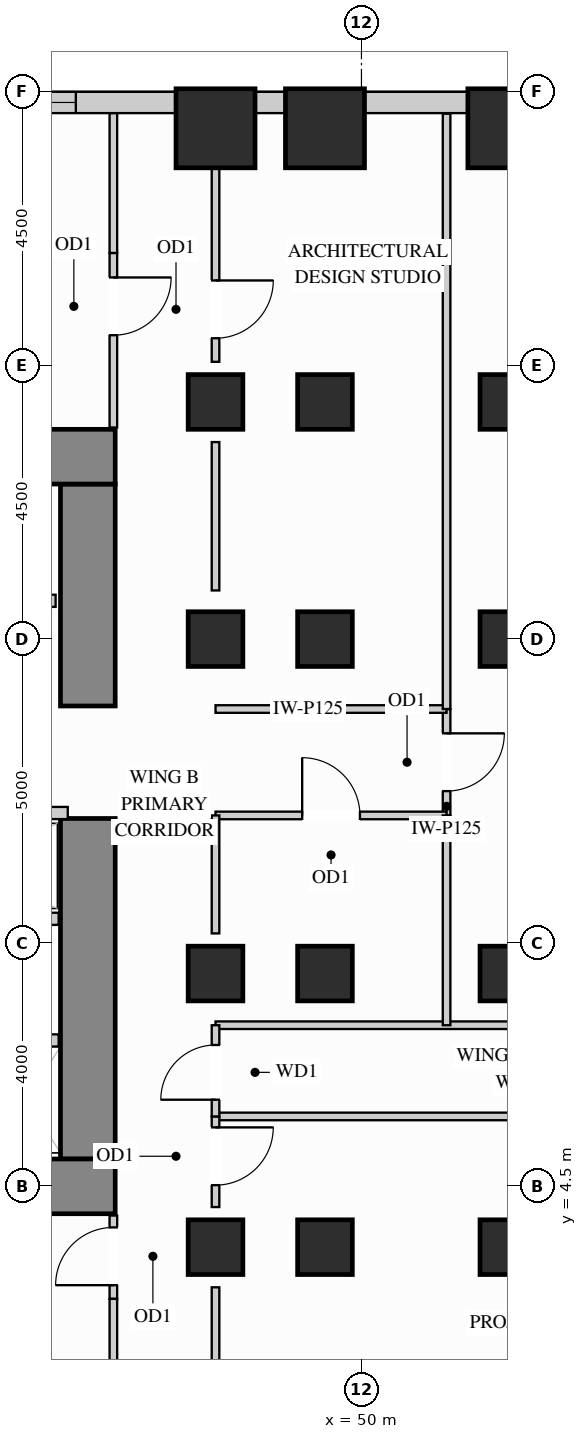
"""IFC4 building model, lengths in metres.
Left out: names, types, materials, properties, quantities, classifications, styles, units other than length and angle.
Written with IfcOpenShell. Run it as: python <this file> out.ifc"""

import sys

from ifc_helpers import new_model, si_unit, direction, frame, frame_2d, origin, origin_2d, place, context, subcontext, project, spatial, rectangle, extrude, source, transform, mapped, element, fill, save


model = new_model("IFC4")
c1 = context("Model", 3, precision=1e-05, world=origin(), true_north=direction((0.0, 1.0)))
c2 = subcontext(c1, "Body", "Model", "MODEL_VIEW")
j1 = project(units=[si_unit("LENGTHUNIT", "METRE"), si_unit("PLANEANGLEUNIT", "RADIAN")], contexts=[c1])
p1 = place(None, origin())
s1 = spatial("IfcSite", under=j1, at=p1, CompositionType="ELEMENT")
p2 = place(p1, origin())
s2 = spatial("IfcBuilding", under=s1, at=p2, CompositionType="ELEMENT")
p3 = place(p2, frame((0.0, 0.0, 47.7)))
s3 = spatial("IfcBuildingStorey", under=s2, at=p3, CompositionType="ELEMENT", Elevation=47.7)
m1 = source(origin(), c2, "Body", "SweptSolid", [
    extrude(rectangle(XDim=0.9, YDim=0.9, at=origin_2d()), origin(), (0.0, 0.0, 1.0), 3.38),
])
for number, where, z_axis, x_axis in (
    (1, (47.6, 13.5, 0.0), (0.0, 0.0, 1.0), (1.0, 0.0, 0.0)),
    (2, (47.6, 3.5, 0.0), (0.0, 0.0, 1.0), (1.0, 0.0, 0.0)),
    (3, (47.6, 8.0, 0.0), (0.0, 0.0, 1.0), (1.0, 0.0, 0.0)),
    (4, (47.6, 17.4, 0.0), (0.0, 0.0, 1.0), (1.0, 0.0, 0.0)),
    (5, (49.4, 13.5, 0.0), (0.0, 0.0, 1.0), (1.0, 0.0, 0.0)),
    (6, (49.4, 17.4, 0.0), (0.0, 0.0, 1.0), (1.0, 0.0, 0.0)),
    (7, (49.4, 3.5, 0.0), (0.0, 0.0, 1.0), (1.0, 0.0, 0.0)),
    (8, (49.4, 8.0, 0.0), (0.0, 0.0, 1.0), (1.0, 0.0, 0.0)),
    (9, (52.4, 13.5, 0.0), (0.0, 0.0, 1.0), (1.0, 0.0, 0.0)),
    (10, (52.4, 17.4, 0.0), (0.0, 0.0, 1.0), (1.0, 0.0, 0.0)),
    (11, (52.4, 3.5, 0.0), (0.0, 0.0, 1.0), (1.0, 0.0, 0.0)),
    (12, (52.4, 8.0, 0.0), (0.0, 0.0, 1.0), (1.0, 0.0, 0.0)),
):
    element("IfcColumn", number, at=place(p3, frame(where, z_axis=z_axis, x_axis=x_axis)), inside=s3, PredefinedType="COLUMN", context=c2, shape_type="MappedRepresentation", body=[
        mapped(m1, transform((0.0, 0.0, 0.0), x_axis=(1.0, 0.0, 0.0), y_axis=(0.0, 1.0, 0.0), z_axis=(0.0, 0.0, 1.0))),
    ])
m2 = source(origin(), c2, "Body", "SweptSolid", [
    extrude(rectangle(XDim=1.3, YDim=1.3, at=origin_2d()), origin(), (0.0, 0.0, 1.0), 3.38),
])
for number, where, z_axis, x_axis in (
    (13, (47.6, 21.9, 0.0), (0.0, 0.0, 1.0), (1.0, 0.0, 0.0)),
    (14, (49.4, 21.9, 0.0), (0.0, 0.0, 1.0), (1.0, 0.0, 0.0)),
    (15, (52.4, 21.9, 0.0), (0.0, 0.0, 1.0), (1.0, 0.0, 0.0)),
):
    element("IfcColumn", number, at=place(p3, frame(where, z_axis=z_axis, x_axis=x_axis)), inside=s3, PredefinedType="COLUMN", context=c2, shape_type="MappedRepresentation", body=[
        mapped(m2, transform((0.0, 0.0, 0.0), x_axis=(1.0, 0.0, 0.0), y_axis=(0.0, 1.0, 0.0), z_axis=(0.0, 0.0, 1.0))),
    ])
m3 = source(origin(), c2, "Body", "SweptSolid", [
    extrude(rectangle(XDim=5.6, YDim=0.9, at=frame_2d((2.8, 0.0))), origin(), (0.0, 0.0, 1.0), 3.38),
])
p4 = place(p3, frame((45.5, 4.95, 0.0), z_axis=(0.0, 0.0, 1.0), x_axis=(0.0, 1.0, 0.0)))
e16 = element("IfcWall", 16, at=p4, inside=s3, PredefinedType="SHEAR", context=c2, shape_type="MappedRepresentation", body=[
    mapped(m3, transform((0.0, 0.0, 0.0), x_axis=(1.0, 0.0, 0.0), y_axis=(0.0, 1.0, 0.0), z_axis=(0.0, 0.0, 1.0))),
])
m4 = source(origin(), c2, "Body", "SweptSolid", [
    extrude(rectangle(XDim=3.65, YDim=0.9, at=frame_2d((1.825, 0.0))), origin(), (0.0, 0.0, 1.0), 3.38),
])
p5 = place(p3, frame((45.5, 12.4, 0.0), z_axis=(0.0, 0.0, 1.0), x_axis=(0.0, 1.0, 0.0)))
e17 = element("IfcWall", 17, at=p5, inside=s3, PredefinedType="SHEAR", context=c2, shape_type="MappedRepresentation", body=[
    mapped(m4, transform((0.0, 0.0, 0.0), x_axis=(1.0, 0.0, 0.0), y_axis=(0.0, 1.0, 0.0), z_axis=(0.0, 0.0, 1.0))),
])
m5 = source(origin(), c2, "Body", "SweptSolid", [
    extrude(rectangle(XDim=10.4, YDim=0.9, at=frame_2d((5.2, 0.0))), origin(), (0.0, 0.0, 1.0), 3.38),
])
for number, where, z_axis, x_axis in (
    (18, (35.55, 16.5, 0.0), (0.0, 0.0, 1.0), (1.0, 0.0, 0.0)),
    (19, (35.55, 4.5, 0.0), (0.0, 0.0, 1.0), (1.0, 0.0, 0.0)),
):
    element("IfcWall", number, at=place(p3, frame(where, z_axis=z_axis, x_axis=x_axis)), inside=s3, PredefinedType="SHEAR", context=c2, shape_type="MappedRepresentation", body=[
        mapped(m5, transform((0.0, 0.0, 0.0), x_axis=(1.0, 0.0, 0.0), y_axis=(0.0, 1.0, 0.0), z_axis=(0.0, 0.0, 1.0))),
    ])
m6 = source(origin(), c2, "Body", "SweptSolid", [
    extrude(rectangle(XDim=1.704, YDim=0.35, at=frame_2d((0.852, 0.0))), origin(), (0.0, 0.0, 1.0), 2.51),
])
p6 = place(p3, frame((51.752, 22.325, 0.0), z_axis=(0.0, 0.0, 1.0), x_axis=(-1.0, 0.0, 0.0)))
e20 = element("IfcWall", 20, at=p6, inside=s3, PredefinedType="SOLIDWALL", context=c2, shape_type="MappedRepresentation", body=[
    mapped(m6, transform((0.0, 0.0, 0.0), x_axis=(1.0, 0.0, 0.0), y_axis=(0.0, 1.0, 0.0), z_axis=(0.0, 0.0, 1.0))),
])
m7 = source(origin(), c2, "Body", "SweptSolid", [
    extrude(rectangle(XDim=0.504, YDim=0.35, at=frame_2d((0.252, 0.0))), origin(), (0.0, 0.0, 1.0), 3.365),
])
p7 = place(p3, frame((48.752, 22.325, 0.0), z_axis=(0.0, 0.0, 1.0), x_axis=(-1.0, 0.0, 0.0)))
e21 = element("IfcWall", 21, at=p7, inside=s3, PredefinedType="SOLIDWALL", context=c2, shape_type="MappedRepresentation", body=[
    mapped(m7, transform((0.0, 0.0, 0.0), x_axis=(1.0, 0.0, 0.0), y_axis=(0.0, 1.0, 0.0), z_axis=(0.0, 0.0, 1.0))),
])
p8 = place(p3, frame((46.952, 22.325, 0.0), z_axis=(0.0, 0.0, 1.0), x_axis=(-1.0, 0.0, 0.0)))
e22 = element("IfcWall", 22, at=p8, inside=s3, PredefinedType="SOLIDWALL", context=c2, shape_type="SweptSolid", body=[
    extrude(rectangle(XDim=6.304, YDim=0.35, at=frame_2d((3.152, 0.0))), origin(), (0.0, 0.0, 1.0), 2.51),
])
p9 = place(p8, frame((1.649, 0.0, 0.78)))
e23 = element("IfcOpeningElement", 23, at=p9, cuts=e22, PredefinedType="OPENING", context=c2, shape_type="SweptSolid", body=[
    extrude(rectangle(XDim=1.8, YDim=1.55, at=frame_2d((0.9, 0.775))), frame((0.0, 0.185, 0.0), z_axis=(0.0, -1.0, 0.0), x_axis=(1.0, 0.0, 0.0)), (0.0, 0.0, 1.0), 0.37),
])
p10 = place(p8, frame((3.817, 0.0, 0.78)))
e24 = element("IfcOpeningElement", 24, at=p10, cuts=e22, PredefinedType="OPENING", context=c2, shape_type="SweptSolid", body=[
    extrude(rectangle(XDim=1.8, YDim=1.55, at=frame_2d((0.9, 0.775))), frame((0.0, 0.185, 0.0), z_axis=(0.0, -1.0, 0.0), x_axis=(1.0, 0.0, 0.0)), (0.0, 0.0, 1.0), 0.37),
])
p11 = place(p3, frame((51.4, 10.6, 0.0), z_axis=(0.0, 0.0, 1.0), x_axis=(0.0, 1.0, 0.0)))
e25 = element("IfcWall", 25, at=p11, inside=s3, PredefinedType="PARTITIONING", context=c2, shape_type="SweptSolid", body=[
    extrude(rectangle(XDim=1.75, YDim=0.125, at=frame_2d((0.875, 0.0))), origin(), (0.0, 0.0, 1.0), 3.365),
])
p12 = place(p11, frame((0.4, 0.0, 0.0)))
e26 = element("IfcOpeningElement", 26, at=p12, cuts=e25, PredefinedType="OPENING", context=c2, shape_type="SweptSolid", body=[
    extrude(rectangle(XDim=0.95, YDim=2.15, at=frame_2d((0.475, 1.075))), frame((0.0, 0.073, 0.0), z_axis=(0.0, -1.0, 0.0), x_axis=(1.0, 0.0, 0.0)), (0.0, 0.0, 1.0), 0.145),
])
m8 = source(origin(), c2, "Body", "SweptSolid", [
    extrude(rectangle(XDim=11.048, YDim=0.125, at=frame_2d((5.524, 0.0))), origin(), (0.0, 0.0, 1.0), 3.365),
])
for number, where, z_axis, x_axis in (
    (27, (47.6, 5.65, 0.0), (0.0, 0.0, 1.0), (1.0, 0.0, 0.0)),
    (28, (47.6, 7.15, 0.0), (0.0, 0.0, 1.0), (1.0, 0.0, 0.0)),
):
    element("IfcWall", number, at=place(p3, frame(where, z_axis=z_axis, x_axis=x_axis)), inside=s3, PredefinedType="PARTITIONING", context=c2, shape_type="MappedRepresentation", body=[
        mapped(m8, transform((0.0, 0.0, 0.0), x_axis=(1.0, 0.0, 0.0), y_axis=(0.0, 1.0, 0.0), z_axis=(0.0, 0.0, 1.0))),
    ])
m9 = source(origin(), c2, "Body", "SweptSolid", [
    extrude(rectangle(XDim=3.8, YDim=0.125, at=frame_2d((1.9, 0.0))), origin(), (0.0, 0.0, 1.0), 3.365),
])
p13 = place(p3, frame((47.6, 12.35, 0.0), z_axis=(0.0, 0.0, 1.0), x_axis=(1.0, 0.0, 0.0)))
e29 = element("IfcWall", 29, at=p13, inside=s3, PredefinedType="PARTITIONING", context=c2, shape_type="MappedRepresentation", body=[
    mapped(m9, transform((0.0, 0.0, 0.0), x_axis=(1.0, 0.0, 0.0), y_axis=(0.0, 1.0, 0.0), z_axis=(0.0, 0.0, 1.0))),
])
p14 = place(p3, frame((47.6, 10.6, 0.0), z_axis=(0.0, 0.0, 1.0), x_axis=(1.0, 0.0, 0.0)))
e30 = element("IfcWall", 30, at=p14, inside=s3, PredefinedType="PARTITIONING", context=c2, shape_type="SweptSolid", body=[
    extrude(rectangle(XDim=3.8, YDim=0.125, at=frame_2d((1.9, 0.0))), origin(), (0.0, 0.0, 1.0), 2.67),
])
p15 = place(p14, frame((1.425, 0.0, 0.0)))
e31 = element("IfcOpeningElement", 31, at=p15, cuts=e30, PredefinedType="OPENING", context=c2, shape_type="SweptSolid", body=[
    extrude(rectangle(XDim=0.95, YDim=2.15, at=frame_2d((0.475, 1.075))), frame((0.0, 0.073, 0.0), z_axis=(0.0, -1.0, 0.0), x_axis=(1.0, 0.0, 0.0)), (0.0, 0.0, 1.0), 0.145),
])
m10 = source(origin(), c2, "Body", "SweptSolid", [
    extrude(rectangle(XDim=3.45, YDim=0.125, at=frame_2d((1.725, 0.0))), origin(), (0.0, 0.0, 1.0), 3.365),
])
p16 = place(p3, frame((51.4, 7.15, 0.0), z_axis=(0.0, 0.0, 1.0), x_axis=(0.0, 1.0, 0.0)))
e32 = element("IfcWall", 32, at=p16, inside=s3, PredefinedType="PARTITIONING", context=c2, shape_type="MappedRepresentation", body=[
    mapped(m10, transform((0.0, 0.0, 0.0), x_axis=(1.0, 0.0, 0.0), y_axis=(0.0, 1.0, 0.0), z_axis=(0.0, 0.0, 1.0))),
])
m11 = source(origin(), c2, "Body", "SweptSolid", [
    extrude(rectangle(XDim=9.79, YDim=0.125, at=frame_2d((4.895, 0.0))), origin(), (0.0, 0.0, 1.0), 3.365),
])
p17 = place(p3, frame((51.4, 12.35, 0.0), z_axis=(0.0, 0.0, 1.0), x_axis=(0.0, 1.0, 0.0)))
e33 = element("IfcWall", 33, at=p17, inside=s3, PredefinedType="PARTITIONING", context=c2, shape_type="MappedRepresentation", body=[
    mapped(m11, transform((0.0, 0.0, 0.0), x_axis=(1.0, 0.0, 0.0), y_axis=(0.0, 1.0, 0.0), z_axis=(0.0, 0.0, 1.0))),
])
p18 = place(p3, frame((47.6, 4.16, 0.0), z_axis=(0.0, 0.0, 1.0), x_axis=(0.0, 1.0, 0.0)))
e34 = element("IfcWall", 34, at=p18, inside=s3, PredefinedType="PARTITIONING", context=c2, shape_type="SweptSolid", body=[
    extrude(rectangle(XDim=1.49, YDim=0.125, at=frame_2d((0.745, 0.0))), origin(), (0.0, 0.0, 1.0), 2.67),
])
p19 = place(p18, frame((0.36, 0.0, 0.0)))
e35 = element("IfcOpeningElement", 35, at=p19, cuts=e34, PredefinedType="OPENING", context=c2, shape_type="SweptSolid", body=[
    extrude(rectangle(XDim=0.95, YDim=2.15, at=frame_2d((0.475, 1.075))), frame((0.0, 0.073, 0.0), z_axis=(0.0, -1.0, 0.0), x_axis=(1.0, 0.0, 0.0)), (0.0, 0.0, 1.0), 0.145),
])
m12 = source(origin(), c2, "Body", "SweptSolid", [
    extrude(rectangle(XDim=1.58, YDim=0.125, at=frame_2d((0.79, 0.0))), origin(), (0.0, 0.0, 1.0), 2.67),
])
p20 = place(p3, frame((47.6, 1.26, 0.0), z_axis=(0.0, 0.0, 1.0), x_axis=(0.0, 1.0, 0.0)))
e36 = element("IfcWall", 36, at=p20, inside=s3, PredefinedType="PARTITIONING", context=c2, shape_type="MappedRepresentation", body=[
    mapped(m12, transform((0.0, 0.0, 0.0), x_axis=(1.0, 0.0, 0.0), y_axis=(0.0, 1.0, 0.0), z_axis=(0.0, 0.0, 1.0))),
])
m13 = source(origin(), c2, "Body", "SweptSolid", [
    extrude(rectangle(XDim=1.94, YDim=0.125, at=frame_2d((0.97, 0.0))), origin(), (0.0, 0.0, 1.0), 2.67),
])
p21 = place(p3, frame((47.6, 8.66, 0.0), z_axis=(0.0, 0.0, 1.0), x_axis=(0.0, 1.0, 0.0)))
e37 = element("IfcWall", 37, at=p21, inside=s3, PredefinedType="PARTITIONING", context=c2, shape_type="MappedRepresentation", body=[
    mapped(m13, transform((0.0, 0.0, 0.0), x_axis=(1.0, 0.0, 0.0), y_axis=(0.0, 1.0, 0.0), z_axis=(0.0, 0.0, 1.0))),
])
m14 = source(origin(), c2, "Body", "SweptSolid", [
    extrude(rectangle(XDim=2.44, YDim=0.125, at=frame_2d((1.22, 0.0))), origin(), (0.0, 0.0, 1.0), 2.67),
])
p22 = place(p3, frame((47.6, 14.3, 0.0), z_axis=(0.0, 0.0, 1.0), x_axis=(0.0, 1.0, 0.0)))
e38 = element("IfcWall", 38, at=p22, inside=s3, PredefinedType="PARTITIONING", context=c2, shape_type="MappedRepresentation", body=[
    mapped(m14, transform((0.0, 0.0, 0.0), x_axis=(1.0, 0.0, 0.0), y_axis=(0.0, 1.0, 0.0), z_axis=(0.0, 0.0, 1.0))),
])
p23 = place(p3, frame((47.6, 18.06, 0.0), z_axis=(0.0, 0.0, 1.0), x_axis=(0.0, 1.0, 0.0)))
e39 = element("IfcWall", 39, at=p23, inside=s3, PredefinedType="PARTITIONING", context=c2, shape_type="SweptSolid", body=[
    extrude(rectangle(XDim=3.18, YDim=0.125, at=frame_2d((1.59, 0.0))), origin(), (0.0, 0.0, 1.0), 2.67),
])
p24 = place(p23, frame((0.388, 0.0, 0.0)))
e40 = element("IfcOpeningElement", 40, at=p24, cuts=e39, PredefinedType="OPENING", context=c2, shape_type="SweptSolid", body=[
    extrude(rectangle(XDim=0.95, YDim=2.15, at=frame_2d((0.475, 1.075))), frame((0.0, 0.073, 0.0), z_axis=(0.0, -1.0, 0.0), x_axis=(1.0, 0.0, 0.0)), (0.0, 0.0, 1.0), 0.145),
])
p25 = place(p3, frame((47.6, 5.65, 0.0), z_axis=(0.0, 0.0, 1.0), x_axis=(0.0, 1.0, 0.0)))
e41 = element("IfcWall", 41, at=p25, inside=s3, PredefinedType="PARTITIONING", context=c2, shape_type="SweptSolid", body=[
    extrude(rectangle(XDim=1.5, YDim=0.125, at=frame_2d((0.75, 0.0))), origin(), (0.0, 0.0, 1.0), 2.67),
])
p26 = place(p25, frame((0.275, 0.0, 0.0)))
e42 = element("IfcOpeningElement", 42, at=p26, cuts=e41, PredefinedType="OPENING", context=c2, shape_type="SweptSolid", body=[
    extrude(rectangle(XDim=0.9, YDim=2.15, at=frame_2d((0.45, 1.075))), frame((0.0, 0.073, 0.0), z_axis=(0.0, -1.0, 0.0), x_axis=(1.0, 0.0, 0.0)), (0.0, 0.0, 1.0), 0.145),
])
p27 = place(p3, frame((45.92, 16.98, 0.0), z_axis=(0.0, 0.0, 1.0), x_axis=(0.0, 1.0, 0.0)))
e43 = element("IfcWall", 43, at=p27, inside=s3, PredefinedType="PARTITIONING", context=c2, shape_type="SweptSolid", body=[
    extrude(rectangle(XDim=2.87, YDim=0.125, at=frame_2d((1.435, 0.0))), origin(), (0.0, 0.0, 1.0), 3.365),
])
p28 = place(p27, frame((1.517, 0.0, 0.0)))
e44 = element("IfcOpeningElement", 44, at=p28, cuts=e43, PredefinedType="OPENING", context=c2, shape_type="SweptSolid", body=[
    extrude(rectangle(XDim=0.95, YDim=2.15, at=frame_2d((0.475, 1.075))), frame((0.0, 0.073, 0.0), z_axis=(0.0, -1.0, 0.0), x_axis=(1.0, 0.0, 0.0)), (0.0, 0.0, 1.0), 0.145),
])
m15 = source(origin(), c2, "Body", "SweptSolid", [
    extrude(rectangle(XDim=2.298, YDim=0.125, at=frame_2d((1.149, 0.0))), origin(), (0.0, 0.0, 1.0), 3.365),
])
p29 = place(p3, frame((45.92, 19.85, 0.0), z_axis=(0.0, 0.0, 1.0), x_axis=(0.0, 1.0, 0.0)))
e45 = element("IfcWall", 45, at=p29, inside=s3, PredefinedType="PARTITIONING", context=c2, shape_type="MappedRepresentation", body=[
    mapped(m15, transform((0.0, 0.0, 0.0), x_axis=(1.0, 0.0, 0.0), y_axis=(0.0, 1.0, 0.0), z_axis=(0.0, 0.0, 1.0))),
])
p30 = place(p3, frame((45.92, 2.65, 0.0), z_axis=(0.0, 0.0, 1.0), x_axis=(0.0, 1.0, 0.0)))
e46 = element("IfcWall", 46, at=p30, inside=s3, PredefinedType="PARTITIONING", context=c2, shape_type="SweptSolid", body=[
    extrude(rectangle(XDim=1.37, YDim=0.125, at=frame_2d((0.685, 0.0))), origin(), (0.0, 0.0, 1.0), 3.365),
])
p31 = place(p30, frame((0.225, 0.0, 0.0)))
e47 = element("IfcOpeningElement", 47, at=p31, cuts=e46, PredefinedType="OPENING", context=c2, shape_type="SweptSolid", body=[
    extrude(rectangle(XDim=0.95, YDim=2.15, at=frame_2d((0.475, 1.075))), frame((0.0, 0.073, 0.0), z_axis=(0.0, -1.0, 0.0), x_axis=(1.0, 0.0, 0.0)), (0.0, 0.0, 1.0), 0.145),
])
p32 = place(p3, frame((45.92, 0.352, 0.0), z_axis=(0.0, 0.0, 1.0), x_axis=(0.0, 1.0, 0.0)))
e48 = element("IfcWall", 48, at=p32, inside=s3, PredefinedType="PARTITIONING", context=c2, shape_type="MappedRepresentation", body=[
    mapped(m15, transform((0.0, 0.0, 0.0), x_axis=(1.0, 0.0, 0.0), y_axis=(0.0, 1.0, 0.0), z_axis=(0.0, 0.0, 1.0))),
])
m16 = source(origin(), c2, "Body", "SweptSolid", [
    extrude(rectangle(XDim=1.17, YDim=0.2, at=frame_2d((0.585, 0.0))), origin(), (0.0, 0.0, 1.0), 3.365),
])
p33 = place(p3, frame((43.85, 6.9, 0.0), z_axis=(0.0, 0.0, 1.0), x_axis=(1.0, 0.0, 0.0)))
e49 = element("IfcWall", 49, at=p33, inside=s3, PredefinedType="PARTITIONING", context=c2, shape_type="MappedRepresentation", body=[
    mapped(m16, transform((0.0, 0.0, 0.0), x_axis=(1.0, 0.0, 0.0), y_axis=(0.0, 1.0, 0.0), z_axis=(0.0, 0.0, 1.0))),
])
p34 = place(p3, frame((42.23, 14.13, 0.0), z_axis=(0.0, 0.0, 1.0), x_axis=(1.0, 0.0, 0.0)))
e50 = element("IfcWall", 50, at=p34, inside=s3, PredefinedType="PARTITIONING", context=c2, shape_type="SweptSolid", body=[
    extrude(rectangle(XDim=2.74, YDim=0.2, at=frame_2d((1.37, 0.0))), origin(), (0.0, 0.0, 1.0), 3.365),
])
p35 = place(p34, frame((0.82, 0.0, 0.0)))
e51 = element("IfcOpeningElement", 51, at=p35, cuts=e50, PredefinedType="OPENING", context=c2, shape_type="SweptSolid", body=[
    extrude(rectangle(XDim=1.1, YDim=2.2, at=frame_2d((0.55, 1.1))), frame((0.0, 0.11, 0.0), z_axis=(0.0, -1.0, 0.0), x_axis=(1.0, 0.0, 0.0)), (0.0, 0.0, 1.0), 0.22),
])
m17 = source(origin(), c2, "Body", "SweptSolid", [
    extrude(rectangle(XDim=3.49, YDim=0.2, at=frame_2d((1.745, 0.0))), origin(), (0.0, 0.0, 1.0), 3.365),
])
p36 = place(p3, frame((41.68, 10.64, 0.0), z_axis=(0.0, 0.0, 1.0), x_axis=(1.0, 0.0, 0.0)))
e52 = element("IfcWall", 52, at=p36, inside=s3, PredefinedType="PARTITIONING", context=c2, shape_type="MappedRepresentation", body=[
    mapped(m17, transform((0.0, 0.0, 0.0), x_axis=(1.0, 0.0, 0.0), y_axis=(0.0, 1.0, 0.0), z_axis=(0.0, 0.0, 1.0))),
])
m18 = source(origin(), c2, "Body", "SweptSolid", [
    extrude(rectangle(XDim=3.34, YDim=0.2, at=frame_2d((1.67, 0.0))), origin(), (0.0, 0.0, 1.0), 3.365),
])
p37 = place(p3, frame((41.68, 8.9, 0.0), z_axis=(0.0, 0.0, 1.0), x_axis=(1.0, 0.0, 0.0)))
e53 = element("IfcWall", 53, at=p37, inside=s3, PredefinedType="PARTITIONING", context=c2, shape_type="MappedRepresentation", body=[
    mapped(m18, transform((0.0, 0.0, 0.0), x_axis=(1.0, 0.0, 0.0), y_axis=(0.0, 1.0, 0.0), z_axis=(0.0, 0.0, 1.0))),
])
m19 = source(origin(), c2, "Body", "SweptSolid", [
    extrude(rectangle(XDim=0.95, YDim=2.15, at=frame_2d((0.475, 1.075))), frame((0.0, 0.025, 0.0), z_axis=(0.0, -1.0, 0.0), x_axis=(1.0, 0.0, 0.0)), (0.0, 0.0, 1.0), 0.05),
])
p38 = place(p28, origin())
e54 = element("IfcDoor", 54, at=p38, inside=s3, OperationType="SINGLE_SWING_RIGHT", PredefinedType="DOOR", context=c2, shape_type="MappedRepresentation", body=[
    mapped(m19, transform((0.0, 0.0, 0.0), x_axis=(1.0, 0.0, 0.0), y_axis=(0.0, 1.0, 0.0), z_axis=(0.0, 0.0, 1.0))),
])
fill(e44, e54)
p39 = place(p31, origin())
e55 = element("IfcDoor", 55, at=p39, inside=s3, OperationType="SINGLE_SWING_LEFT", PredefinedType="DOOR", context=c2, shape_type="MappedRepresentation", body=[
    mapped(m19, transform((0.0, 0.0, 0.0), x_axis=(1.0, 0.0, 0.0), y_axis=(0.0, 1.0, 0.0), z_axis=(0.0, 0.0, 1.0))),
])
fill(e47, e55)
p40 = place(p19, origin())
e56 = element("IfcDoor", 56, at=p40, inside=s3, OperationType="SINGLE_SWING_RIGHT", PredefinedType="DOOR", context=c2, shape_type="MappedRepresentation", body=[
    mapped(m19, transform((0.0, 0.0, 0.0), x_axis=(1.0, 0.0, 0.0), y_axis=(0.0, 1.0, 0.0), z_axis=(0.0, 0.0, 1.0))),
])
fill(e35, e56)
p41 = place(p15, origin())
e57 = element("IfcDoor", 57, at=p41, inside=s3, OperationType="SINGLE_SWING_LEFT", PredefinedType="DOOR", context=c2, shape_type="MappedRepresentation", body=[
    mapped(m19, transform((0.0, 0.0, 0.0), x_axis=(1.0, 0.0, 0.0), y_axis=(0.0, 1.0, 0.0), z_axis=(0.0, 0.0, 1.0))),
])
fill(e31, e57)
p42 = place(p12, origin())
e58 = element("IfcDoor", 58, at=p42, inside=s3, OperationType="SINGLE_SWING_RIGHT", PredefinedType="DOOR", context=c2, shape_type="MappedRepresentation", body=[
    mapped(m19, transform((0.0, 0.0, 0.0), x_axis=(1.0, 0.0, 0.0), y_axis=(0.0, 1.0, 0.0), z_axis=(0.0, 0.0, 1.0))),
])
fill(e26, e58)
p43 = place(p24, origin())
e59 = element("IfcDoor", 59, at=p43, inside=s3, OperationType="SINGLE_SWING_RIGHT", PredefinedType="DOOR", context=c2, shape_type="MappedRepresentation", body=[
    mapped(m19, transform((0.0, 0.0, 0.0), x_axis=(1.0, 0.0, 0.0), y_axis=(0.0, 1.0, 0.0), z_axis=(0.0, 0.0, 1.0))),
])
fill(e40, e59)
m20 = source(origin(), c2, "Body", "SweptSolid", [
    extrude(rectangle(XDim=0.9, YDim=2.15, at=frame_2d((0.45, 1.075))), frame((0.0, 0.025, 0.0), z_axis=(0.0, -1.0, 0.0), x_axis=(1.0, 0.0, 0.0)), (0.0, 0.0, 1.0), 0.05),
])
p44 = place(p26, origin())
e60 = element("IfcDoor", 60, at=p44, inside=s3, OperationType="SINGLE_SWING_LEFT", PredefinedType="DOOR", context=c2, shape_type="MappedRepresentation", body=[
    mapped(m20, transform((0.0, 0.0, 0.0), x_axis=(1.0, 0.0, 0.0), y_axis=(0.0, 1.0, 0.0), z_axis=(0.0, 0.0, 1.0))),
])
fill(e42, e60)
m21 = source(origin(), c2, "Body", "SweptSolid", [
    extrude(rectangle(XDim=1.8, YDim=1.55, at=frame_2d((0.9, 0.775))), frame((0.0, 0.03, 0.0), z_axis=(0.0, -1.0, 0.0), x_axis=(1.0, 0.0, 0.0)), (0.0, 0.0, 1.0), 0.06),
])
p45 = place(p9, origin())
e61 = element("IfcWindow", 61, at=p45, inside=s3, PartitioningType="SINGLE_PANEL", PredefinedType="WINDOW", context=c2, shape_type="MappedRepresentation", body=[
    mapped(m21, transform((0.0, 0.0, 0.0), x_axis=(1.0, 0.0, 0.0), y_axis=(0.0, 1.0, 0.0), z_axis=(0.0, 0.0, 1.0))),
])
fill(e23, e61)
save(model, sys.argv[1])
